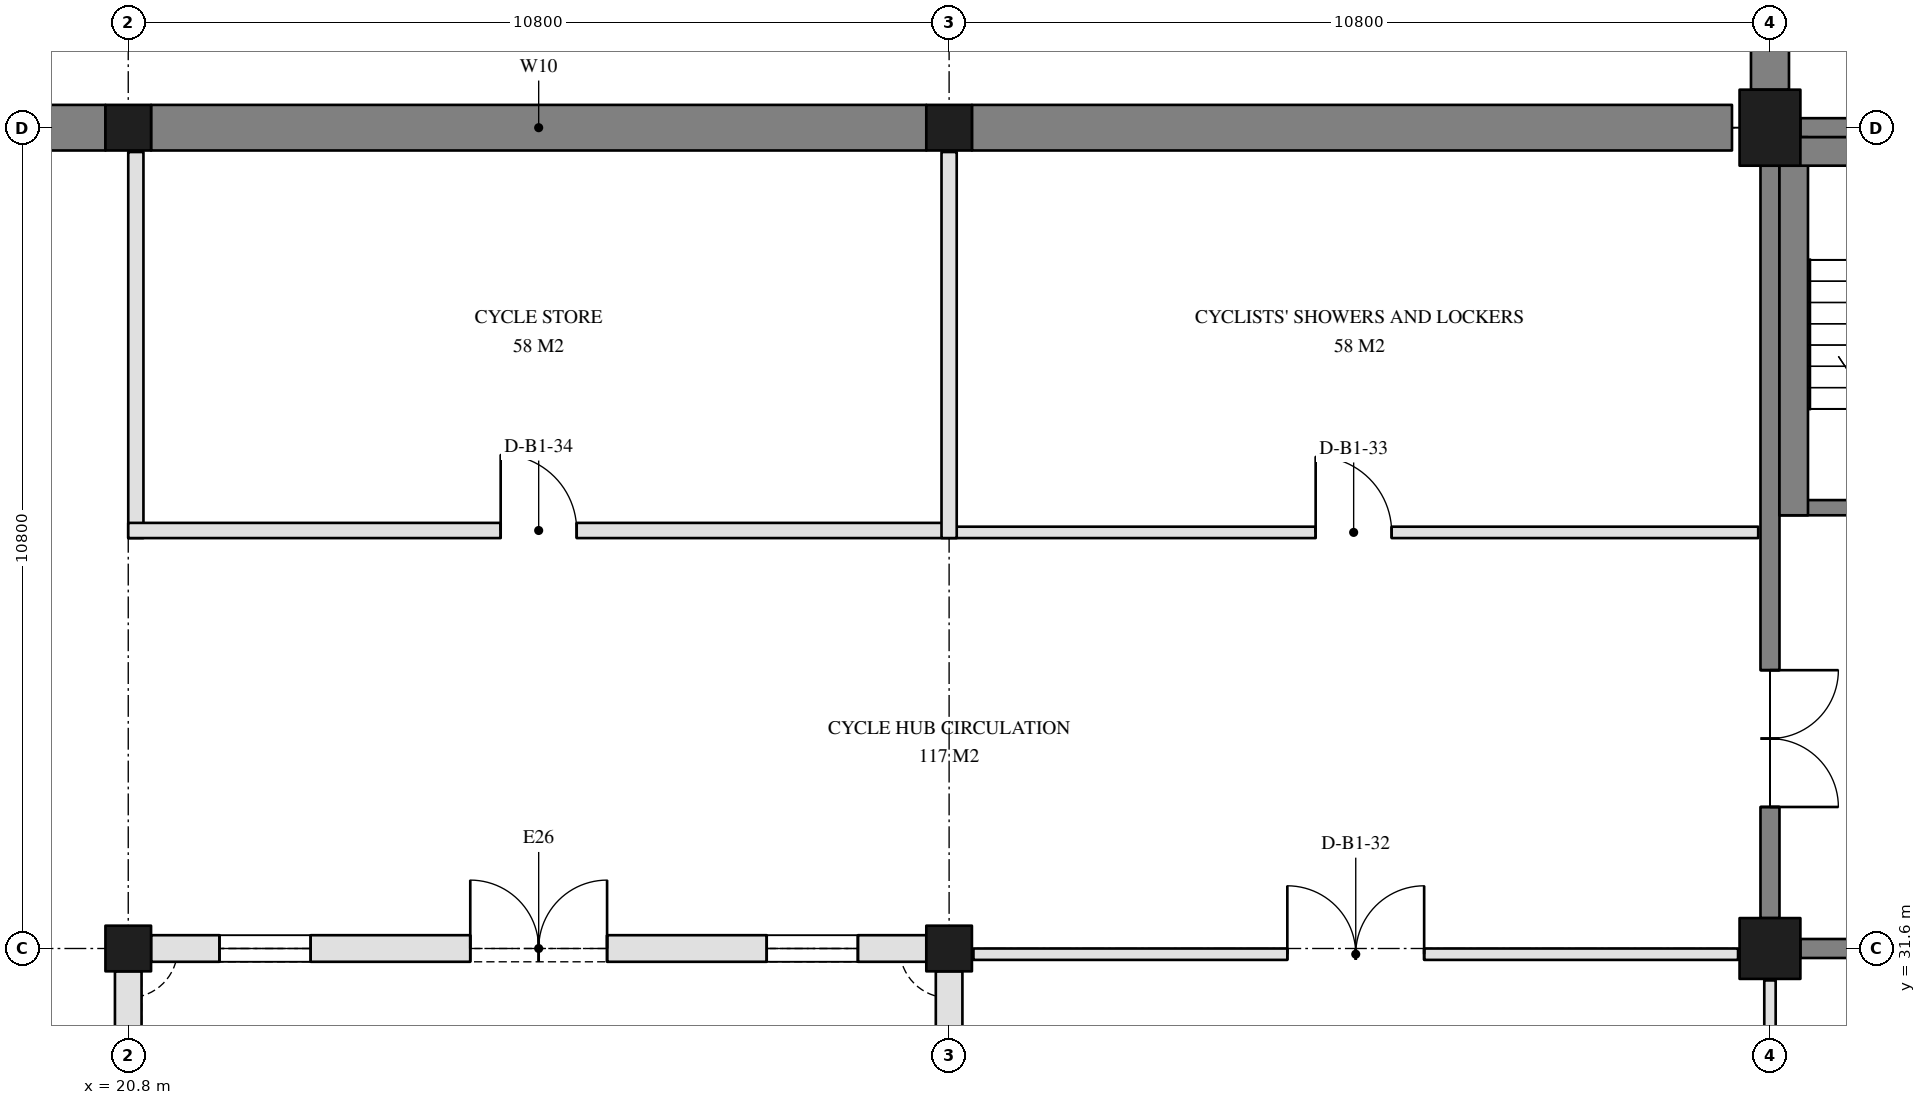
"""IFC4 building model, lengths in metres.
Left out: names, types, materials, properties, quantities, classifications, styles, units other than length and angle.
Written with IfcOpenShell. Run it as: python <this file> out.ifc"""

import sys

from ifc_helpers import new_model, si_unit, direction, frame, frame_2d, origin, origin_2d, place, context, subcontext, project, spatial, rectangle, extrude, element, fill, save


model = new_model("IFC4")
c1 = context("Model", 3, precision=1e-05, world=origin(), true_north=direction((0.0, 1.0)))
c2 = subcontext(c1, "Body", "Model", "MODEL_VIEW")
j1 = project(units=[si_unit("LENGTHUNIT", "METRE"), si_unit("PLANEANGLEUNIT", "RADIAN")], contexts=[c1])
p1 = place(None, origin())
s1 = spatial("IfcSite", under=j1, at=p1, CompositionType="ELEMENT")
p2 = place(p1, origin())
s2 = spatial("IfcBuilding", under=s1, at=p2, CompositionType="ELEMENT")
p3 = place(p2, frame((0.0, 0.0, -5.4)))
s3 = spatial("IfcBuildingStorey", under=s2, at=p3, CompositionType="ELEMENT", Elevation=-5.4)
p4 = place(p3, frame((42.4, 42.4, -0.4), z_axis=(0.0, 0.0, 1.0), x_axis=(1.0, 0.0, 0.0)))
e1 = element("IfcColumn", 1, at=p4, inside=s3, PredefinedType="COLUMN", context=c2, shape_type="SweptSolid", body=[
    extrude(rectangle(XDim=0.8, YDim=1.0, at=origin_2d()), origin(), (0.0, 0.0, 1.0), 5.8),
])
p5 = place(p3, frame((42.4, 31.6, -0.4), z_axis=(0.0, 0.0, 1.0), x_axis=(1.0, 0.0, 0.0)))
e2 = element("IfcColumn", 2, at=p5, inside=s3, PredefinedType="COLUMN", context=c2, shape_type="SweptSolid", body=[
    extrude(rectangle(XDim=0.8, YDim=0.8, at=origin_2d()), origin(), (0.0, 0.0, 1.0), 5.8),
])
for number, where, z_axis, x_axis in (
    (3, (20.8, 31.6, -0.4), (0.0, 0.0, 1.0), (1.0, 0.0, 0.0)),
    (4, (20.8, 42.4, -0.4), (0.0, 0.0, 1.0), (1.0, 0.0, 0.0)),
    (5, (31.6, 31.6, -0.4), (0.0, 0.0, 1.0), (1.0, 0.0, 0.0)),
    (6, (31.6, 42.4, -0.4), (0.0, 0.0, 1.0), (1.0, 0.0, 0.0)),
):
    element("IfcColumn", number, at=place(p3, frame(where, z_axis=z_axis, x_axis=x_axis)), inside=s3, PredefinedType="COLUMN", context=c2, shape_type="SweptSolid", body=[
        extrude(rectangle(XDim=0.6, YDim=0.6, at=origin_2d()), origin(), (0.0, 0.0, 1.0), 5.8),
    ])
for number, where, z_axis, x_axis in (
    (7, (42.8, 31.6, 0.0), (0.0, 0.0, 1.0), (1.0, 0.0, 0.0)),
    (8, (52.8, 42.4, 0.0), (0.0, 0.0, 1.0), (-1.0, 0.0, 0.0)),
):
    element("IfcWall", number, at=place(p3, frame(where, z_axis=z_axis, x_axis=x_axis)), inside=s3, PredefinedType="SOLIDWALL", context=c2, shape_type="SweptSolid", body=[
        extrude(rectangle(XDim=10.0, YDim=0.25, at=frame_2d((5.0, 0.0))), origin(), (0.0, 0.0, 1.0), 5.4),
    ])
p6 = place(p3, frame((42.4, 41.9, 0.0), z_axis=(0.0, 0.0, 1.0), x_axis=(0.0, -1.0, 0.0)))
e9 = element("IfcWall", 9, at=p6, inside=s3, PredefinedType="SOLIDWALL", context=c2, shape_type="SweptSolid", body=[
    extrude(rectangle(XDim=9.9, YDim=0.25, at=frame_2d((4.95, 0.0))), origin(), (0.0, 0.0, 1.0), 5.4),
])
p7 = place(p6, frame((6.638, 0.0, 0.0)))
e10 = element("IfcOpeningElement", 10, at=p7, cuts=e9, PredefinedType="OPENING", context=c2, shape_type="SweptSolid", body=[
    extrude(rectangle(XDim=1.8, YDim=2.1, at=frame_2d((0.9, 1.05))), frame((0.0, 0.135, 0.0), z_axis=(0.0, -1.0, 0.0), x_axis=(1.0, 0.0, 0.0)), (0.0, 0.0, 1.0), 0.27),
])
for number, where, z_axis, x_axis in (
    (11, (10.3, 42.4, 0.0), (0.0, 0.0, 1.0), (1.0, 0.0, 0.0)),
    (12, (21.1, 42.4, 0.0), (0.0, 0.0, 1.0), (1.0, 0.0, 0.0)),
):
    element("IfcWall", number, at=place(p3, frame(where, z_axis=z_axis, x_axis=x_axis)), inside=s3, PredefinedType="SOLIDWALL", context=c2, shape_type="SweptSolid", body=[
        extrude(rectangle(XDim=10.2, YDim=0.6, at=frame_2d((5.1, 0.0))), origin(), (0.0, 0.0, 1.0), 3.9),
    ])
p8 = place(p3, frame((31.9, 42.4, 0.0), z_axis=(0.0, 0.0, 1.0), x_axis=(1.0, 0.0, 0.0)))
e13 = element("IfcWall", 13, at=p8, inside=s3, PredefinedType="SOLIDWALL", context=c2, shape_type="SweptSolid", body=[
    extrude(rectangle(XDim=10.0, YDim=0.6, at=frame_2d((5.0, 0.0))), origin(), (0.0, 0.0, 1.0), 3.9),
])
p9 = place(p3, frame((21.1, 31.6, 0.0), z_axis=(0.0, 0.0, 1.0), x_axis=(1.0, 0.0, 0.0)))
e14 = element("IfcWall", 14, at=p9, inside=s3, PredefinedType="SOLIDWALL", context=c2, shape_type="SweptSolid", body=[
    extrude(rectangle(XDim=10.2, YDim=0.35, at=frame_2d((5.1, 0.0))), origin(), (0.0, 0.0, 1.0), 3.6),
])
p10 = place(p9, frame((0.9, 0.0, 0.9)))
e15 = element("IfcOpeningElement", 15, at=p10, cuts=e14, PredefinedType="OPENING", context=c2, shape_type="SweptSolid", body=[
    extrude(rectangle(XDim=1.2, YDim=1.5, at=frame_2d((0.6, 0.75))), frame((0.0, 0.185, 0.0), z_axis=(0.0, -1.0, 0.0), x_axis=(1.0, 0.0, 0.0)), (0.0, 0.0, 1.0), 0.37),
])
p11 = place(p9, frame((4.2, 0.0, 0.0)))
e16 = element("IfcOpeningElement", 16, at=p11, cuts=e14, PredefinedType="OPENING", context=c2, shape_type="SweptSolid", body=[
    extrude(rectangle(XDim=1.8, YDim=2.4, at=frame_2d((0.9, 1.2))), frame((0.0, 0.185, 0.0), z_axis=(0.0, -1.0, 0.0), x_axis=(1.0, 0.0, 0.0)), (0.0, 0.0, 1.0), 0.37),
])
p12 = place(p9, frame((8.1, 0.0, 0.9)))
e17 = element("IfcOpeningElement", 17, at=p12, cuts=e14, PredefinedType="OPENING", context=c2, shape_type="SweptSolid", body=[
    extrude(rectangle(XDim=1.2, YDim=1.5, at=frame_2d((0.6, 0.75))), frame((0.0, 0.185, 0.0), z_axis=(0.0, -1.0, 0.0), x_axis=(1.0, 0.0, 0.0)), (0.0, 0.0, 1.0), 0.37),
])
p13 = place(p3, frame((20.8, 21.1, 0.0), z_axis=(0.0, 0.0, 1.0), x_axis=(0.0, 1.0, 0.0)))
e18 = element("IfcWall", 18, at=p13, inside=s3, PredefinedType="SOLIDWALL", context=c2, shape_type="SweptSolid", body=[
    extrude(rectangle(XDim=10.2, YDim=0.35, at=frame_2d((5.1, 0.0))), origin(), (0.0, 0.0, 1.0), 3.6),
])
p14 = place(p13, frame((0.9, 0.0, 0.9)))
e19 = element("IfcOpeningElement", 19, at=p14, cuts=e18, PredefinedType="OPENING", context=c2, shape_type="SweptSolid", body=[
    extrude(rectangle(XDim=1.2, YDim=1.5, at=frame_2d((0.6, 0.75))), frame((0.0, 0.185, 0.0), z_axis=(0.0, -1.0, 0.0), x_axis=(1.0, 0.0, 0.0)), (0.0, 0.0, 1.0), 0.37),
])
p15 = place(p13, frame((4.2, 0.0, 0.0)))
e20 = element("IfcOpeningElement", 20, at=p15, cuts=e18, PredefinedType="OPENING", context=c2, shape_type="SweptSolid", body=[
    extrude(rectangle(XDim=1.8, YDim=2.4, at=frame_2d((0.9, 1.2))), frame((0.0, 0.185, 0.0), z_axis=(0.0, -1.0, 0.0), x_axis=(1.0, 0.0, 0.0)), (0.0, 0.0, 1.0), 0.37),
])
p16 = place(p13, frame((8.1, 0.0, 0.9)))
e21 = element("IfcOpeningElement", 21, at=p16, cuts=e18, PredefinedType="OPENING", context=c2, shape_type="SweptSolid", body=[
    extrude(rectangle(XDim=1.2, YDim=1.5, at=frame_2d((0.6, 0.75))), frame((0.0, 0.185, 0.0), z_axis=(0.0, -1.0, 0.0), x_axis=(1.0, 0.0, 0.0)), (0.0, 0.0, 1.0), 0.37),
])
p17 = place(p3, frame((31.6, 21.1, 0.0), z_axis=(0.0, 0.0, 1.0), x_axis=(0.0, 1.0, 0.0)))
e22 = element("IfcWall", 22, at=p17, inside=s3, PredefinedType="SOLIDWALL", context=c2, shape_type="SweptSolid", body=[
    extrude(rectangle(XDim=10.2, YDim=0.35, at=frame_2d((5.1, 0.0))), origin(), (0.0, 0.0, 1.0), 3.6),
])
p18 = place(p17, frame((0.9, 0.0, 0.9)))
e23 = element("IfcOpeningElement", 23, at=p18, cuts=e22, PredefinedType="OPENING", context=c2, shape_type="SweptSolid", body=[
    extrude(rectangle(XDim=1.2, YDim=1.5, at=frame_2d((0.6, 0.75))), frame((0.0, 0.185, 0.0), z_axis=(0.0, -1.0, 0.0), x_axis=(1.0, 0.0, 0.0)), (0.0, 0.0, 1.0), 0.37),
])
p19 = place(p17, frame((4.2, 0.0, 0.0)))
e24 = element("IfcOpeningElement", 24, at=p19, cuts=e22, PredefinedType="OPENING", context=c2, shape_type="SweptSolid", body=[
    extrude(rectangle(XDim=1.8, YDim=2.4, at=frame_2d((0.9, 1.2))), frame((0.0, 0.185, 0.0), z_axis=(0.0, -1.0, 0.0), x_axis=(1.0, 0.0, 0.0)), (0.0, 0.0, 1.0), 0.37),
])
p20 = place(p17, frame((8.1, 0.0, 0.9)))
e25 = element("IfcOpeningElement", 25, at=p20, cuts=e22, PredefinedType="OPENING", context=c2, shape_type="SweptSolid", body=[
    extrude(rectangle(XDim=1.2, YDim=1.5, at=frame_2d((0.6, 0.75))), frame((0.0, 0.185, 0.0), z_axis=(0.0, -1.0, 0.0), x_axis=(1.0, 0.0, 0.0)), (0.0, 0.0, 1.0), 0.37),
])
p21 = place(p3, frame((42.4, 42.9, 0.0), z_axis=(0.0, 0.0, 1.0), x_axis=(0.0, 1.0, 0.0)))
e26 = element("IfcWall", 26, at=p21, inside=s3, PredefinedType="SOLIDWALL", context=c2, shape_type="SweptSolid", body=[
    extrude(rectangle(XDim=9.8, YDim=0.5, at=frame_2d((4.9, 0.0))), origin(), (0.0, 0.0, 1.0), 3.8),
])
p22 = place(p3, frame((42.525, 37.4, 0.0), z_axis=(0.0, 0.0, 1.0), x_axis=(1.0, 0.0, 0.0)))
e27 = element("IfcWall", 27, at=p22, inside=s3, PredefinedType="SOLIDWALL", context=c2, shape_type="SweptSolid", body=[
    extrude(rectangle(XDim=2.925, YDim=0.2, at=frame_2d((1.462, 0.0))), origin(), (0.0, 0.0, 1.0), 4.8),
])
p23 = place(p22, frame((1.05, 0.0, 0.0)))
e28 = element("IfcOpeningElement", 28, at=p23, cuts=e27, PredefinedType="OPENING", context=c2, shape_type="SweptSolid", body=[
    extrude(rectangle(XDim=1.2, YDim=2.1, at=frame_2d((0.6, 1.05))), frame((0.0, 0.11, 0.0), z_axis=(0.0, -1.0, 0.0), x_axis=(1.0, 0.0, 0.0)), (0.0, 0.0, 1.0), 0.22),
])
p24 = place(p3, frame((42.712, 37.3, 0.0), z_axis=(0.0, 0.0, 1.0), x_axis=(0.0, 1.0, 0.0)))
e29 = element("IfcWall", 29, at=p24, inside=s3, PredefinedType="SOLIDWALL", context=c2, shape_type="SweptSolid", body=[
    extrude(rectangle(XDim=4.975, YDim=0.375, at=frame_2d((2.487, 0.0))), origin(), (0.0, 0.0, 1.0), 4.8),
])
p25 = place(p3, frame((42.525, 42.087, 0.0), z_axis=(0.0, 0.0, 1.0), x_axis=(1.0, 0.0, 0.0)))
e30 = element("IfcWall", 30, at=p25, inside=s3, PredefinedType="SOLIDWALL", context=c2, shape_type="SweptSolid", body=[
    extrude(rectangle(XDim=2.925, YDim=0.375, at=frame_2d((1.462, 0.0))), origin(), (0.0, 0.0, 1.0), 4.8),
])
p26 = place(p3, frame((42.4, 24.4, 0.0), z_axis=(0.0, 0.0, 1.0), x_axis=(0.0, 1.0, 0.0)))
e31 = element("IfcWall", 31, at=p26, inside=s3, PredefinedType="PARTITIONING", context=c2, shape_type="SweptSolid", body=[
    extrude(rectangle(XDim=6.78, YDim=0.15, at=frame_2d((3.39, 0.0))), origin(), (0.0, 0.0, 1.0), 3.9),
])
p27 = place(p3, frame((20.9, 37.0, 0.0), z_axis=(0.0, 0.0, 1.0), x_axis=(0.0, 1.0, 0.0)))
e32 = element("IfcWall", 32, at=p27, inside=s3, PredefinedType="PARTITIONING", context=c2, shape_type="SweptSolid", body=[
    extrude(rectangle(XDim=5.08, YDim=0.2, at=frame_2d((2.54, 0.0))), origin(), (0.0, 0.0, 1.0), 3.6),
])
p28 = place(p3, frame((31.92, 31.525, 0.0), z_axis=(0.0, 0.0, 1.0), x_axis=(1.0, 0.0, 0.0)))
e33 = element("IfcWall", 33, at=p28, inside=s3, PredefinedType="PARTITIONING", context=c2, shape_type="SweptSolid", body=[
    extrude(rectangle(XDim=10.06, YDim=0.15, at=frame_2d((5.03, 0.0))), origin(), (0.0, 0.0, 1.0), 3.6),
])
p29 = place(p28, frame((4.13, 0.0, 0.0)))
e34 = element("IfcOpeningElement", 34, at=p29, cuts=e33, PredefinedType="OPENING", context=c2, shape_type="SweptSolid", body=[
    extrude(rectangle(XDim=1.8, YDim=2.1, at=frame_2d((0.9, 1.05))), frame((0.0, 0.085, 0.0), z_axis=(0.0, -1.0, 0.0), x_axis=(1.0, 0.0, 0.0)), (0.0, 0.0, 1.0), 0.17),
])
p30 = place(p3, frame((31.6, 37.075, 0.0), z_axis=(0.0, 0.0, 1.0), x_axis=(1.0, 0.0, 0.0)))
e35 = element("IfcWall", 35, at=p30, inside=s3, PredefinedType="PARTITIONING", context=c2, shape_type="SweptSolid", body=[
    extrude(rectangle(XDim=10.645, YDim=0.15, at=frame_2d((5.323, 0.0))), origin(), (0.0, 0.0, 1.0), 3.6),
])
p31 = place(p30, frame((4.823, 0.0, 0.0)))
e36 = element("IfcOpeningElement", 36, at=p31, cuts=e35, PredefinedType="OPENING", context=c2, shape_type="SweptSolid", body=[
    extrude(rectangle(XDim=1.0, YDim=2.1, at=frame_2d((0.5, 1.05))), frame((0.0, 0.085, 0.0), z_axis=(0.0, -1.0, 0.0), x_axis=(1.0, 0.0, 0.0)), (0.0, 0.0, 1.0), 0.17),
])
p32 = place(p3, frame((20.8, 37.1, 0.0), z_axis=(0.0, 0.0, 1.0), x_axis=(1.0, 0.0, 0.0)))
e37 = element("IfcWall", 37, at=p32, inside=s3, PredefinedType="PARTITIONING", context=c2, shape_type="SweptSolid", body=[
    extrude(rectangle(XDim=10.8, YDim=0.2, at=frame_2d((5.4, 0.0))), origin(), (0.0, 0.0, 1.0), 3.6),
])
p33 = place(p32, frame((4.9, 0.0, 0.0)))
e38 = element("IfcOpeningElement", 38, at=p33, cuts=e37, PredefinedType="OPENING", context=c2, shape_type="SweptSolid", body=[
    extrude(rectangle(XDim=1.0, YDim=2.1, at=frame_2d((0.5, 1.05))), frame((0.0, 0.11, 0.0), z_axis=(0.0, -1.0, 0.0), x_axis=(1.0, 0.0, 0.0)), (0.0, 0.0, 1.0), 0.22),
])
p34 = place(p3, frame((31.6, 37.0, 0.0), z_axis=(0.0, 0.0, 1.0), x_axis=(0.0, 1.0, 0.0)))
e39 = element("IfcWall", 39, at=p34, inside=s3, PredefinedType="PARTITIONING", context=c2, shape_type="SweptSolid", body=[
    extrude(rectangle(XDim=5.08, YDim=0.2, at=frame_2d((2.54, 0.0))), origin(), (0.0, 0.0, 1.0), 3.6),
])
p35 = place(p10, origin())
e40 = element("IfcWindow", 40, at=p35, inside=s3, PartitioningType="SINGLE_PANEL", PredefinedType="WINDOW", context=c2, shape_type="SweptSolid", body=[
    extrude(rectangle(XDim=1.2, YDim=1.5, at=frame_2d((0.6, 0.75))), frame((0.0, 0.03, 0.0), z_axis=(0.0, -1.0, 0.0), x_axis=(1.0, 0.0, 0.0)), (0.0, 0.0, 1.0), 0.06),
])
fill(e15, e40)
p36 = place(p11, origin())
e41 = element("IfcDoor", 41, at=p36, inside=s3, OperationType="DOUBLE_DOOR_DOUBLE_SWING", PredefinedType="DOOR", context=c2, shape_type="SweptSolid", body=[
    extrude(rectangle(XDim=1.8, YDim=2.4, at=frame_2d((0.9, 1.2))), frame((0.0, 0.025, 0.0), z_axis=(0.0, -1.0, 0.0), x_axis=(1.0, 0.0, 0.0)), (0.0, 0.0, 1.0), 0.05),
])
fill(e16, e41)
p37 = place(p12, origin())
e42 = element("IfcWindow", 42, at=p37, inside=s3, PartitioningType="SINGLE_PANEL", PredefinedType="WINDOW", context=c2, shape_type="SweptSolid", body=[
    extrude(rectangle(XDim=1.2, YDim=1.5, at=frame_2d((0.6, 0.75))), frame((0.0, 0.03, 0.0), z_axis=(0.0, -1.0, 0.0), x_axis=(1.0, 0.0, 0.0)), (0.0, 0.0, 1.0), 0.06),
])
fill(e17, e42)
p38 = place(p7, frame((1.8, 0.0, 0.0), z_axis=(0.0, 0.0, 1.0), x_axis=(-1.0, 0.0, 0.0)))
e43 = element("IfcDoor", 43, at=p38, inside=s3, OperationType="DOUBLE_DOOR_DOUBLE_SWING", PredefinedType="DOOR", context=c2, shape_type="SweptSolid", body=[
    extrude(rectangle(XDim=1.8, YDim=2.1, at=frame_2d((0.9, 1.05))), frame((0.0, 0.025, 0.0), z_axis=(0.0, -1.0, 0.0), x_axis=(1.0, 0.0, 0.0)), (0.0, 0.0, 1.0), 0.05),
])
fill(e10, e43)
p39 = place(p29, frame((1.8, 0.0, 0.0), z_axis=(0.0, 0.0, 1.0), x_axis=(-1.0, 0.0, 0.0)))
e44 = element("IfcDoor", 44, at=p39, inside=s3, OperationType="DOUBLE_DOOR_DOUBLE_SWING", PredefinedType="DOOR", context=c2, shape_type="SweptSolid", body=[
    extrude(rectangle(XDim=1.8, YDim=2.1, at=frame_2d((0.9, 1.05))), frame((0.0, 0.025, 0.0), z_axis=(0.0, -1.0, 0.0), x_axis=(1.0, 0.0, 0.0)), (0.0, 0.0, 1.0), 0.05),
])
fill(e34, e44)
p40 = place(p31, origin())
e45 = element("IfcDoor", 45, at=p40, inside=s3, OperationType="SINGLE_SWING_LEFT", PredefinedType="DOOR", context=c2, shape_type="SweptSolid", body=[
    extrude(rectangle(XDim=1.0, YDim=2.1, at=frame_2d((0.5, 1.05))), frame((0.0, 0.025, 0.0), z_axis=(0.0, -1.0, 0.0), x_axis=(1.0, 0.0, 0.0)), (0.0, 0.0, 1.0), 0.05),
])
fill(e36, e45)
p41 = place(p33, origin())
e46 = element("IfcDoor", 46, at=p41, inside=s3, OperationType="SINGLE_SWING_RIGHT", PredefinedType="DOOR", context=c2, shape_type="SweptSolid", body=[
    extrude(rectangle(XDim=1.0, YDim=2.1, at=frame_2d((0.5, 1.05))), frame((0.0, 0.025, 0.0), z_axis=(0.0, -1.0, 0.0), x_axis=(1.0, 0.0, 0.0)), (0.0, 0.0, 1.0), 0.05),
])
fill(e38, e46)
save(model, sys.argv[1])
